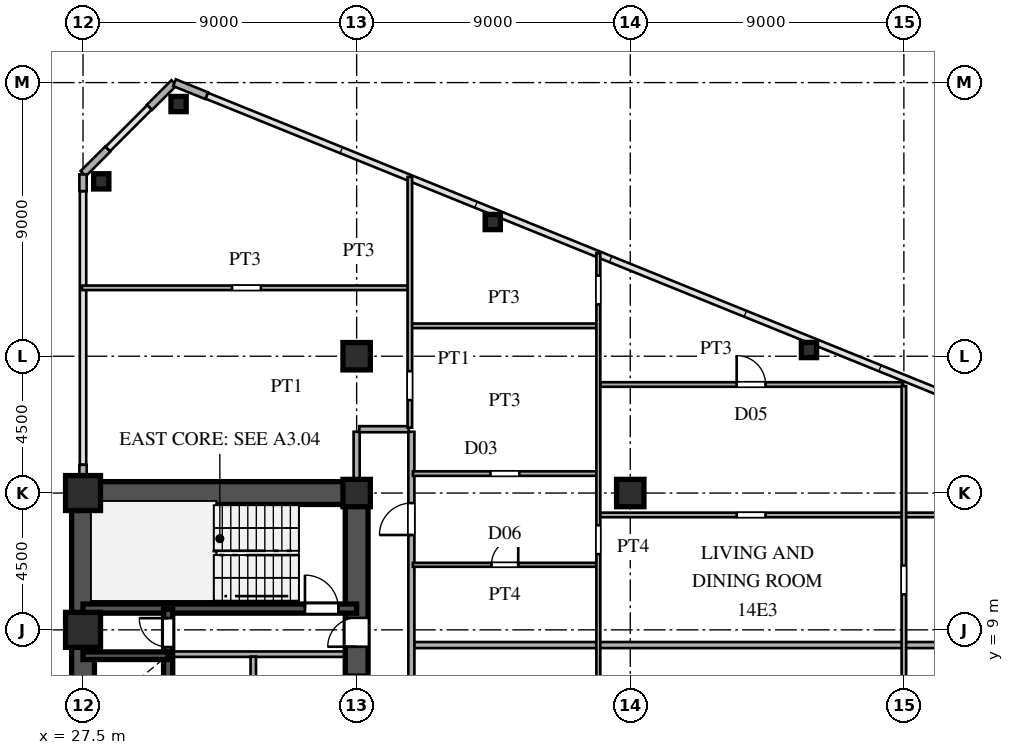
"""IFC4 building model, lengths in metres.
Left out: names, types, materials, properties, quantities, classifications, styles, units other than length and angle.
Written with IfcOpenShell. Run it as: python <this file> out.ifc"""

import sys

from ifc_helpers import new_model, si_unit, direction, frame, frame_2d, origin, origin_2d, place, context, subcontext, project, spatial, rectangle, hollow_rectangle, i_section, extrude, source, transform, mapped, element, fill, save


model = new_model("IFC4")
c1 = context("Model", 3, precision=1e-05, world=origin(), true_north=direction((0.0, 1.0)))
c2 = subcontext(c1, "Body", "Model", "MODEL_VIEW")
j1 = project(units=[si_unit("LENGTHUNIT", "METRE"), si_unit("PLANEANGLEUNIT", "RADIAN")], contexts=[c1])
p1 = place(None, origin())
s1 = spatial("IfcSite", under=j1, at=p1, CompositionType="ELEMENT")
p2 = place(p1, origin())
s2 = spatial("IfcBuilding", under=s1, at=p2, CompositionType="ELEMENT")
p3 = place(p2, frame((0.0, 0.0, 54.9)))
s3 = spatial("IfcBuildingStorey", under=s2, at=p3, CompositionType="ELEMENT", Elevation=54.9)
m1 = source(origin(), c2, "Body", "SweptSolid", [
    extrude(hollow_rectangle(XDim=1.15, YDim=1.15, WallThickness=0.048, at=origin_2d()), origin(), (0.0, 0.0, 1.0), 3.6),
])
for number, where, z_axis, x_axis in (
    (1, (27.5, 9.0, 0.0), (0.0, 0.0, 1.0), (1.0, 0.0, 0.0)),
    (2, (27.5, 13.5, 0.0), (0.0, 0.0, 1.0), (1.0, 0.0, 0.0)),
):
    element("IfcColumn", number, at=place(p3, frame(where, z_axis=z_axis, x_axis=x_axis)), inside=s3, PredefinedType="COLUMN", context=c2, shape_type="MappedRepresentation", body=[
        mapped(m1, transform((0.0, 0.0, 0.0), scale=1.0)),
    ])
m2 = source(origin(), c2, "Body", "SweptSolid", [
    extrude(i_section(OverallWidth=0.9, OverallDepth=0.9, WebThickness=0.036, FlangeThickness=0.055, at=origin_2d()), origin(), (0.0, 0.0, 1.0), 3.6),
])
for number, where, z_axis, x_axis in (
    (3, (36.5, 13.5, 0.0), (0.0, 0.0, 1.0), (1.0, 0.0, 0.0)),
    (4, (36.5, 18.0, 0.0), (0.0, 0.0, 1.0), (1.0, 0.0, 0.0)),
    (5, (45.5, 13.5, 0.0), (0.0, 0.0, 1.0), (1.0, 0.0, 0.0)),
):
    element("IfcColumn", number, at=place(p3, frame(where, z_axis=z_axis, x_axis=x_axis)), inside=s3, PredefinedType="COLUMN", context=c2, shape_type="MappedRepresentation", body=[
        mapped(m2, transform((0.0, 0.0, 0.0), scale=1.0)),
    ])
m3 = source(origin(), c2, "Body", "SweptSolid", [
    extrude(hollow_rectangle(XDim=0.5, YDim=0.5, WallThickness=0.02, at=origin_2d()), origin(), (0.0, 0.0, 1.0), 3.6),
])
for number, where, z_axis, x_axis in (
    (6, (30.643, 26.295, 0.0), (0.0, 0.0, 1.0), (1.0, 0.0, 0.0)),
    (7, (28.1, 23.751, 0.0), (0.0, 0.0, 1.0), (1.0, 0.0, 0.0)),
    (8, (40.977, 22.414, 0.0), (0.0, 0.0, 1.0), (1.0, 0.0, 0.0)),
    (9, (51.378, 18.204, 0.0), (0.0, 0.0, 1.0), (1.0, 0.0, 0.0)),
):
    element("IfcColumn", number, at=place(p3, frame(where, z_axis=z_axis, x_axis=x_axis)), inside=s3, PredefinedType="COLUMN", context=c2, shape_type="MappedRepresentation", body=[
        mapped(m3, transform((0.0, 0.0, 0.0), scale=1.0)),
    ])
p4 = place(p3, frame((31.566, 26.569, 0.0), z_axis=(0.0, 0.0, 1.0), x_axis=(-0.927007103665, 0.375043770452, 0.0)))
e10 = element("IfcWall", 10, at=p4, inside=s3, PredefinedType="SOLIDWALL", context=c2, shape_type="SweptSolid", body=[
    extrude(rectangle(XDim=1.14, YDim=0.24, at=frame_2d((0.57, 0.0))), origin(), (0.0, 0.0, 1.0), 3.38),
])
for number, where, z_axis, x_axis in (
    (11, (30.493, 26.993, 0.0), (0.0, 0.0, 1.0), (-0.707, -0.707, 0.0)),
    (12, (28.313, 24.813, 0.0), (0.0, 0.0, 1.0), (-0.707, -0.707, 0.0)),
):
    element("IfcWall", number, at=place(p3, frame(where, z_axis=z_axis, x_axis=x_axis)), inside=s3, PredefinedType="SOLIDWALL", context=c2, shape_type="SweptSolid", body=[
        extrude(rectangle(XDim=1.14, YDim=0.24, at=frame_2d((0.57, 0.0))), origin(), (0.0, 0.0, 1.0), 3.38),
    ])
p5 = place(p3, frame((27.5, 13.88, 0.0), z_axis=(0.0, 0.0, 1.0), x_axis=(0.0, 1.0, 0.0)))
e13 = element("IfcWall", 13, at=p5, inside=s3, PredefinedType="SOLIDWALL", context=c2, shape_type="SweptSolid", body=[
    extrude(rectangle(XDim=0.55, YDim=0.24, at=frame_2d((0.275, 0.0))), origin(), (0.0, 0.0, 1.0), 2.88),
])
p6 = place(p3, frame((27.5, 23.43, 0.0), z_axis=(0.0, 0.0, 1.0), x_axis=(0.0, 1.0, 0.0)))
e14 = element("IfcWall", 14, at=p6, inside=s3, PredefinedType="SOLIDWALL", context=c2, shape_type="SweptSolid", body=[
    extrude(rectangle(XDim=0.55, YDim=0.24, at=frame_2d((0.275, 0.0))), origin(), (0.0, 0.0, 1.0), 3.38),
])
p7 = place(p3, frame((27.5, 1.3, 0.0), z_axis=(0.0, 0.0, 1.0), x_axis=(0.0, 1.0, 0.0)))
e15 = element("IfcWall", 15, at=p7, inside=s3, PredefinedType="SHEAR", context=c2, shape_type="SweptSolid", body=[
    extrude(rectangle(XDim=12.2, YDim=0.75, at=frame_2d((6.1, 0.0))), origin(), (0.0, 0.0, 1.0), 3.38),
])
p8 = place(p3, frame((27.5, 13.5, 0.0), z_axis=(0.0, 0.0, 1.0), x_axis=(1.0, 0.0, 0.0)))
e16 = element("IfcWall", 16, at=p8, inside=s3, PredefinedType="SHEAR", context=c2, shape_type="SweptSolid", body=[
    extrude(rectangle(XDim=9.0, YDim=0.75, at=frame_2d((4.5, 0.0))), origin(), (0.0, 0.0, 1.0), 3.38),
])
p9 = place(p3, frame((36.5, 8.2, 0.0), z_axis=(0.0, 0.0, 1.0), x_axis=(0.0, 1.0, 0.0)))
e17 = element("IfcWall", 17, at=p9, inside=s3, PredefinedType="SHEAR", context=c2, shape_type="SweptSolid", body=[
    extrude(rectangle(XDim=5.45, YDim=0.75, at=frame_2d((2.725, 0.0))), origin(), (0.0, 0.0, 1.0), 3.38),
])
p10 = place(p9, frame((0.245, 0.0, 0.0)))
e18 = element("IfcOpeningElement", 18, at=p10, cuts=e17, PredefinedType="OPENING", context=c2, shape_type="SweptSolid", body=[
    extrude(rectangle(XDim=0.95, YDim=2.15, at=frame_2d((0.475, 1.075))), frame((0.0, 0.385, 0.0), z_axis=(0.0, -1.0, 0.0), x_axis=(1.0, 0.0, 0.0)), (0.0, 0.0, 1.0), 0.77),
])
p11 = place(p3, frame((36.5, 5.9, 0.0), z_axis=(0.0, 0.0, 1.0), x_axis=(0.0, 1.0, 0.0)))
e19 = element("IfcWall", 19, at=p11, inside=s3, PredefinedType="SHEAR", context=c2, shape_type="SweptSolid", body=[
    extrude(rectangle(XDim=2.3, YDim=0.75, at=frame_2d((1.15, 0.0))), origin(), (0.0, 0.0, 1.0), 3.38),
])
p12 = place(p11, frame((0.675, 0.0, 0.0)))
e20 = element("IfcOpeningElement", 20, at=p12, cuts=e19, PredefinedType="OPENING", context=c2, shape_type="SweptSolid", body=[
    extrude(rectangle(XDim=0.95, YDim=2.15, at=frame_2d((0.475, 1.075))), frame((0.0, 0.385, 0.0), z_axis=(0.0, -1.0, 0.0), x_axis=(1.0, 0.0, 0.0)), (0.0, 0.0, 1.0), 0.77),
])
p13 = place(p3, frame((27.5, 9.7, 0.0), z_axis=(0.0, 0.0, 1.0), x_axis=(1.0, 0.0, 0.0)))
e21 = element("IfcWall", 21, at=p13, inside=s3, PredefinedType="SHEAR", context=c2, shape_type="SweptSolid", body=[
    extrude(rectangle(XDim=9.0, YDim=0.3, at=frame_2d((4.5, 0.0))), origin(), (0.0, 0.0, 1.0), 3.38),
])
p14 = place(p13, frame((7.3, 0.0, 0.0)))
e22 = element("IfcOpeningElement", 22, at=p14, cuts=e21, PredefinedType="OPENING", context=c2, shape_type="SweptSolid", body=[
    extrude(rectangle(XDim=1.1, YDim=2.2, at=frame_2d((0.55, 1.1))), frame((0.0, 0.16, 0.0), z_axis=(0.0, -1.0, 0.0), x_axis=(1.0, 0.0, 0.0)), (0.0, 0.0, 1.0), 0.32),
])
p15 = place(p3, frame((27.5, 8.15, 0.0), z_axis=(0.0, 0.0, 1.0), x_axis=(1.0, 0.0, 0.0)))
e23 = element("IfcWall", 23, at=p15, inside=s3, PredefinedType="SHEAR", context=c2, shape_type="SweptSolid", body=[
    extrude(rectangle(XDim=2.8, YDim=0.25, at=frame_2d((1.4, 0.0))), origin(), (0.0, 0.0, 1.0), 3.38),
])
p16 = place(p3, frame((30.3, 5.9, 0.0), z_axis=(0.0, 0.0, 1.0), x_axis=(0.0, 1.0, 0.0)))
e24 = element("IfcWall", 24, at=p16, inside=s3, PredefinedType="SHEAR", context=c2, shape_type="SweptSolid", body=[
    extrude(rectangle(XDim=2.25, YDim=0.3, at=frame_2d((1.125, 0.0))), origin(), (0.0, 0.0, 1.0), 3.38),
])
p17 = place(p3, frame((30.3, 8.15, 0.0), z_axis=(0.0, 0.0, 1.0), x_axis=(0.0, 1.0, 0.0)))
e25 = element("IfcWall", 25, at=p17, inside=s3, PredefinedType="SHEAR", context=c2, shape_type="SweptSolid", body=[
    extrude(rectangle(XDim=1.53, YDim=0.3, at=frame_2d((0.765, 0.0))), origin(), (0.0, 0.0, 1.0), 3.38),
])
p18 = place(p17, frame((0.285, 0.0, 0.0)))
e26 = element("IfcOpeningElement", 26, at=p18, cuts=e25, PredefinedType="OPENING", context=c2, shape_type="SweptSolid", body=[
    extrude(rectangle(XDim=0.95, YDim=2.15, at=frame_2d((0.475, 1.075))), frame((0.0, 0.16, 0.0), z_axis=(0.0, -1.0, 0.0), x_axis=(1.0, 0.0, 0.0)), (0.0, 0.0, 1.0), 0.32),
])
p19 = place(p3, frame((30.45, 8.2, 0.0), z_axis=(0.0, 0.0, 1.0), x_axis=(1.0, 0.0, 0.0)))
e27 = element("IfcWall", 27, at=p19, inside=s3, PredefinedType="PARTITIONING", context=c2, shape_type="SweptSolid", body=[
    extrude(rectangle(XDim=5.7, YDim=0.18, at=frame_2d((2.85, 0.0))), origin(), (0.0, 0.0, 1.0), 3.38),
])
p20 = place(p3, frame((33.1, 1.38, 0.0), z_axis=(0.0, 0.0, 1.0), x_axis=(0.0, 1.0, 0.0)))
e28 = element("IfcWall", 28, at=p20, inside=s3, PredefinedType="PARTITIONING", context=c2, shape_type="SweptSolid", body=[
    extrude(rectangle(XDim=6.74, YDim=0.18, at=frame_2d((3.37, 0.0))), origin(), (0.0, 0.0, 1.0), 3.38),
])
p21 = place(p3, frame((38.38, 8.5, 0.0), z_axis=(0.0, 0.0, 1.0), x_axis=(1.0, 0.0, 0.0)))
e29 = element("IfcWall", 29, at=p21, inside=s3, PredefinedType="PARTITIONING", context=c2, shape_type="SweptSolid", body=[
    extrude(rectangle(XDim=34.125, YDim=0.2, at=frame_2d((17.062, 0.0))), origin(), (0.0, 0.0, 1.0), 3.38),
])
p22 = place(p3, frame((38.35, 11.14, 0.0), z_axis=(0.0, 0.0, 1.0), x_axis=(1.0, 0.0, 0.0)))
e30 = element("IfcWall", 30, at=p22, inside=s3, PredefinedType="PARTITIONING", context=c2, shape_type="SweptSolid", body=[
    extrude(rectangle(XDim=6.05, YDim=0.13, at=frame_2d((3.025, 0.0))), origin(), (0.0, 0.0, 1.0), 3.38),
])
p23 = place(p22, frame((2.585, 0.0, 0.0)))
e31 = element("IfcOpeningElement", 31, at=p23, cuts=e30, PredefinedType="OPENING", context=c2, shape_type="SweptSolid", body=[
    extrude(rectangle(XDim=0.88, YDim=2.1, at=frame_2d((0.44, 1.05))), frame((0.0, 0.075, 0.0), z_axis=(0.0, -1.0, 0.0), x_axis=(1.0, 0.0, 0.0)), (0.0, 0.0, 1.0), 0.15),
])
p24 = place(p3, frame((44.5, 12.78, 0.0), z_axis=(0.0, 0.0, 1.0), x_axis=(1.0, 0.0, 0.0)))
e32 = element("IfcWall", 32, at=p24, inside=s3, PredefinedType="PARTITIONING", context=c2, shape_type="SweptSolid", body=[
    extrude(rectangle(XDim=21.156, YDim=0.15, at=frame_2d((10.578, 0.0))), origin(), (0.0, 0.0, 1.0), 3.38),
])
p25 = place(p24, frame((4.5, 0.0, 0.0)))
e33 = element("IfcOpeningElement", 33, at=p25, cuts=e32, PredefinedType="OPENING", context=c2, shape_type="SweptSolid", body=[
    extrude(rectangle(XDim=0.95, YDim=2.15, at=frame_2d((0.475, 1.075))), frame((0.0, 0.085, 0.0), z_axis=(0.0, -1.0, 0.0), x_axis=(1.0, 0.0, 0.0)), (0.0, 0.0, 1.0), 0.17),
])
p26 = place(p24, frame((12.375, 0.0, 0.0)))
e34 = element("IfcOpeningElement", 34, at=p26, cuts=e32, PredefinedType="OPENING", context=c2, shape_type="SweptSolid", body=[
    extrude(rectangle(XDim=0.95, YDim=2.15, at=frame_2d((0.475, 1.075))), frame((0.0, 0.085, 0.0), z_axis=(0.0, -1.0, 0.0), x_axis=(1.0, 0.0, 0.0)), (0.0, 0.0, 1.0), 0.17),
])
p27 = place(p3, frame((38.35, 14.14, 0.0), z_axis=(0.0, 0.0, 1.0), x_axis=(1.0, 0.0, 0.0)))
e35 = element("IfcWall", 35, at=p27, inside=s3, PredefinedType="PARTITIONING", context=c2, shape_type="SweptSolid", body=[
    extrude(rectangle(XDim=6.05, YDim=0.15, at=frame_2d((3.025, 0.0))), origin(), (0.0, 0.0, 1.0), 3.38),
])
p28 = place(p27, frame((2.55, 0.0, 0.0)))
e36 = element("IfcOpeningElement", 36, at=p28, cuts=e35, PredefinedType="OPENING", context=c2, shape_type="SweptSolid", body=[
    extrude(rectangle(XDim=0.95, YDim=2.15, at=frame_2d((0.475, 1.075))), frame((0.0, 0.085, 0.0), z_axis=(0.0, -1.0, 0.0), x_axis=(1.0, 0.0, 0.0)), (0.0, 0.0, 1.0), 0.17),
])
p29 = place(p3, frame((36.585, 15.6, 0.0), z_axis=(0.0, 0.0, 1.0), x_axis=(1.0, 0.0, 0.0)))
e37 = element("IfcWall", 37, at=p29, inside=s3, PredefinedType="PARTITIONING", context=c2, shape_type="SweptSolid", body=[
    extrude(rectangle(XDim=1.63, YDim=0.2, at=frame_2d((0.815, 0.0))), origin(), (0.0, 0.0, 1.0), 3.38),
])
p30 = place(p3, frame((44.5, 17.07, 0.0), z_axis=(0.0, 0.0, 1.0), x_axis=(1.0, 0.0, 0.0)))
e38 = element("IfcWall", 38, at=p30, inside=s3, PredefinedType="PARTITIONING", context=c2, shape_type="SweptSolid", body=[
    extrude(rectangle(XDim=9.95, YDim=0.15, at=frame_2d((4.975, 0.0))), origin(), (0.0, 0.0, 1.0), 3.38),
])
p31 = place(p30, frame((4.5, 0.0, 0.0)))
e39 = element("IfcOpeningElement", 39, at=p31, cuts=e38, PredefinedType="OPENING", context=c2, shape_type="SweptSolid", body=[
    extrude(rectangle(XDim=0.95, YDim=2.15, at=frame_2d((0.475, 1.075))), frame((0.0, 0.085, 0.0), z_axis=(0.0, -1.0, 0.0), x_axis=(1.0, 0.0, 0.0)), (0.0, 0.0, 1.0), 0.17),
])
p32 = place(p3, frame((38.3, 19.0, 0.0), z_axis=(0.0, 0.0, 1.0), x_axis=(1.0, 0.0, 0.0)))
e40 = element("IfcWall", 40, at=p32, inside=s3, PredefinedType="PARTITIONING", context=c2, shape_type="SweptSolid", body=[
    extrude(rectangle(XDim=6.1, YDim=0.15, at=frame_2d((3.05, 0.0))), origin(), (0.0, 0.0, 1.0), 3.38),
])
p33 = place(p3, frame((27.465, 20.25, 0.0), z_axis=(0.0, 0.0, 1.0), x_axis=(1.0, 0.0, 0.0)))
e41 = element("IfcWall", 41, at=p33, inside=s3, PredefinedType="PARTITIONING", context=c2, shape_type="SweptSolid", body=[
    extrude(rectangle(XDim=10.735, YDim=0.15, at=frame_2d((5.367, 0.0))), origin(), (0.0, 0.0, 1.0), 3.38),
])
p34 = place(p33, frame((4.935, 0.0, 0.0)))
e42 = element("IfcOpeningElement", 42, at=p34, cuts=e41, PredefinedType="OPENING", context=c2, shape_type="SweptSolid", body=[
    extrude(rectangle(XDim=0.95, YDim=2.15, at=frame_2d((0.475, 1.075))), frame((0.0, 0.085, 0.0), z_axis=(0.0, -1.0, 0.0), x_axis=(1.0, 0.0, 0.0)), (0.0, 0.0, 1.0), 0.17),
])
p35 = place(p3, frame((36.5, 13.88, 0.0), z_axis=(0.0, 0.0, 1.0), x_axis=(0.0, 1.0, 0.0)))
e43 = element("IfcWall", 43, at=p35, inside=s3, PredefinedType="PARTITIONING", context=c2, shape_type="SweptSolid", body=[
    extrude(rectangle(XDim=1.635, YDim=0.2, at=frame_2d((0.817, 0.0))), origin(), (0.0, 0.0, 1.0), 2.68),
])
p36 = place(p3, frame((38.25, 15.65, 0.0), z_axis=(0.0, 0.0, 1.0), x_axis=(0.0, 1.0, 0.0)))
e44 = element("IfcWall", 44, at=p36, inside=s3, PredefinedType="PARTITIONING", context=c2, shape_type="SweptSolid", body=[
    extrude(rectangle(XDim=8.248, YDim=0.15, at=frame_2d((4.124, 0.0))), origin(), (0.0, 0.0, 1.0), 3.38),
])
p37 = place(p36, frame((0.907, 0.0, 0.0)))
e45 = element("IfcOpeningElement", 45, at=p37, cuts=e44, PredefinedType="OPENING", context=c2, shape_type="SweptSolid", body=[
    extrude(rectangle(XDim=0.95, YDim=2.15, at=frame_2d((0.475, 1.075))), frame((0.0, 0.085, 0.0), z_axis=(0.0, -1.0, 0.0), x_axis=(1.0, 0.0, 0.0)), (0.0, 0.0, 1.0), 0.17),
])
p38 = place(p3, frame((38.3, -15.515, 0.0), z_axis=(0.0, 0.0, 1.0), x_axis=(0.0, 1.0, 0.0)))
e46 = element("IfcWall", 46, at=p38, inside=s3, PredefinedType="PARTITIONING", context=c2, shape_type="SweptSolid", body=[
    extrude(rectangle(XDim=31.03, YDim=0.2, at=frame_2d((15.515, 0.0))), origin(), (0.0, 0.0, 1.0), 3.38),
])
p39 = place(p38, frame((4.413, 0.0, 0.0)))
e47 = element("IfcOpeningElement", 47, at=p39, cuts=e46, PredefinedType="OPENING", context=c2, shape_type="SweptSolid", body=[
    extrude(rectangle(XDim=1.05, YDim=2.25, at=frame_2d((0.525, 1.125))), frame((0.0, 0.11, 0.0), z_axis=(0.0, -1.0, 0.0), x_axis=(1.0, 0.0, 0.0)), (0.0, 0.0, 1.0), 0.22),
])
p40 = place(p38, frame((16.28, 0.0, 0.0)))
e48 = element("IfcOpeningElement", 48, at=p40, cuts=e46, PredefinedType="OPENING", context=c2, shape_type="SweptSolid", body=[
    extrude(rectangle(XDim=1.05, YDim=2.25, at=frame_2d((0.525, 1.125))), frame((0.0, 0.11, 0.0), z_axis=(0.0, -1.0, 0.0), x_axis=(1.0, 0.0, 0.0)), (0.0, 0.0, 1.0), 0.22),
])
p41 = place(p38, frame((27.635, 0.0, 0.0)))
e49 = element("IfcOpeningElement", 49, at=p41, cuts=e46, PredefinedType="OPENING", context=c2, shape_type="SweptSolid", body=[
    extrude(rectangle(XDim=1.05, YDim=2.25, at=frame_2d((0.525, 1.125))), frame((0.0, 0.11, 0.0), z_axis=(0.0, -1.0, 0.0), x_axis=(1.0, 0.0, 0.0)), (0.0, 0.0, 1.0), 0.22),
])
p42 = place(p3, frame((44.45, 4.352, 0.0), z_axis=(0.0, 0.0, 1.0), x_axis=(0.0, 1.0, 0.0)))
e50 = element("IfcWall", 50, at=p42, inside=s3, PredefinedType="PARTITIONING", context=c2, shape_type="SweptSolid", body=[
    extrude(rectangle(XDim=17.037, YDim=0.13, at=frame_2d((8.519, 0.0))), origin(), (0.0, 0.0, 1.0), 3.38),
])
p43 = place(p42, frame((7.138, 0.0, 0.0)))
e51 = element("IfcOpeningElement", 51, at=p43, cuts=e50, PredefinedType="OPENING", context=c2, shape_type="SweptSolid", body=[
    extrude(rectangle(XDim=0.95, YDim=2.15, at=frame_2d((0.475, 1.075))), frame((0.0, 0.075, 0.0), z_axis=(0.0, -1.0, 0.0), x_axis=(1.0, 0.0, 0.0)), (0.0, 0.0, 1.0), 0.15),
])
p44 = place(p42, frame((15.352, 0.0, 0.0)))
e52 = element("IfcOpeningElement", 52, at=p44, cuts=e50, PredefinedType="OPENING", context=c2, shape_type="SweptSolid", body=[
    extrude(rectangle(XDim=0.95, YDim=2.15, at=frame_2d((0.475, 1.075))), frame((0.0, 0.075, 0.0), z_axis=(0.0, -1.0, 0.0), x_axis=(1.0, 0.0, 0.0)), (0.0, 0.0, 1.0), 0.15),
])
p45 = place(p3, frame((54.5, -16.019, 0.0), z_axis=(0.0, 0.0, 1.0), x_axis=(0.0, 1.0, 0.0)))
e53 = element("IfcWall", 53, at=p45, inside=s3, PredefinedType="PARTITIONING", context=c2, shape_type="SweptSolid", body=[
    extrude(rectangle(XDim=33.038, YDim=0.15, at=frame_2d((16.519, 0.0))), origin(), (0.0, 0.0, 1.0), 2.68),
])
p46 = place(p45, frame((7.402, 0.0, 0.0)))
e54 = element("IfcOpeningElement", 54, at=p46, cuts=e53, PredefinedType="OPENING", context=c2, shape_type="SweptSolid", body=[
    extrude(rectangle(XDim=0.95, YDim=2.15, at=frame_2d((0.475, 1.075))), frame((0.0, 0.085, 0.0), z_axis=(0.0, -1.0, 0.0), x_axis=(1.0, 0.0, 0.0)), (0.0, 0.0, 1.0), 0.17),
])
p47 = place(p45, frame((17.044, 0.0, 0.0)))
e55 = element("IfcOpeningElement", 55, at=p47, cuts=e53, PredefinedType="OPENING", context=c2, shape_type="SweptSolid", body=[
    extrude(rectangle(XDim=0.95, YDim=2.15, at=frame_2d((0.475, 1.075))), frame((0.0, 0.085, 0.0), z_axis=(0.0, -1.0, 0.0), x_axis=(1.0, 0.0, 0.0)), (0.0, 0.0, 1.0), 0.17),
])
p48 = place(p45, frame((26.186, 0.0, 0.0)))
e56 = element("IfcOpeningElement", 56, at=p48, cuts=e53, PredefinedType="OPENING", context=c2, shape_type="SweptSolid", body=[
    extrude(rectangle(XDim=0.95, YDim=2.15, at=frame_2d((0.475, 1.075))), frame((0.0, 0.085, 0.0), z_axis=(0.0, -1.0, 0.0), x_axis=(1.0, 0.0, 0.0)), (0.0, 0.0, 1.0), 0.17),
])
m4 = source(origin(), c2, "Body", "SweptSolid", [
    extrude(rectangle(XDim=0.95, YDim=2.15, at=frame_2d((0.475, 1.075))), frame((0.0, 0.025, 0.0), z_axis=(0.0, -1.0, 0.0), x_axis=(1.0, 0.0, 0.0)), (0.0, 0.0, 1.0), 0.05),
])
p49 = place(p10, origin())
e57 = element("IfcDoor", 57, at=p49, inside=s3, OperationType="SINGLE_SWING_LEFT", PredefinedType="DOOR", context=c2, shape_type="MappedRepresentation", body=[
    mapped(m4, transform((0.0, 0.0, 0.0), scale=1.0)),
])
fill(e18, e57)
p50 = place(p12, origin())
e58 = element("IfcDoor", 58, at=p50, inside=s3, OperationType="SINGLE_SWING_LEFT", PredefinedType="DOOR", context=c2, shape_type="MappedRepresentation", body=[
    mapped(m4, transform((0.0, 0.0, 0.0), scale=1.0)),
])
fill(e20, e58)
m5 = source(origin(), c2, "Body", "SweptSolid", [
    extrude(rectangle(XDim=1.1, YDim=2.2, at=frame_2d((0.55, 1.1))), frame((0.0, 0.025, 0.0), z_axis=(0.0, -1.0, 0.0), x_axis=(1.0, 0.0, 0.0)), (0.0, 0.0, 1.0), 0.05),
])
p51 = place(p14, origin())
e59 = element("IfcDoor", 59, at=p51, inside=s3, OperationType="SINGLE_SWING_LEFT", PredefinedType="DOOR", context=c2, shape_type="MappedRepresentation", body=[
    mapped(m5, transform((0.0, 0.0, 0.0), scale=1.0)),
])
fill(e22, e59)
p52 = place(p18, origin())
e60 = element("IfcDoor", 60, at=p52, inside=s3, OperationType="SINGLE_SWING_RIGHT", PredefinedType="DOOR", context=c2, shape_type="MappedRepresentation", body=[
    mapped(m4, transform((0.0, 0.0, 0.0), scale=1.0)),
])
fill(e26, e60)
m6 = source(origin(), c2, "Body", "SweptSolid", [
    extrude(rectangle(XDim=0.88, YDim=2.1, at=frame_2d((0.44, 1.05))), frame((0.0, 0.025, 0.0), z_axis=(0.0, -1.0, 0.0), x_axis=(1.0, 0.0, 0.0)), (0.0, 0.0, 1.0), 0.05),
])
p53 = place(p23, origin())
e61 = element("IfcDoor", 61, at=p53, inside=s3, OperationType="SINGLE_SWING_RIGHT", PredefinedType="DOOR", context=c2, shape_type="MappedRepresentation", body=[
    mapped(m6, transform((0.0, 0.0, 0.0), scale=1.0)),
])
fill(e31, e61)
m7 = source(origin(), c2, "Body", "SweptSolid", [
    extrude(rectangle(XDim=0.95, YDim=2.15, at=frame_2d((0.475, 1.075))), frame((0.0, 0.025, 0.0), z_axis=(0.0, -1.0, 0.0), x_axis=(1.0, 0.0, 0.0)), (0.0, 0.0, 1.0), 0.05),
])
p54 = place(p31, origin())
e62 = element("IfcDoor", 62, at=p54, inside=s3, OperationType="SINGLE_SWING_LEFT", PredefinedType="DOOR", context=c2, shape_type="MappedRepresentation", body=[
    mapped(m7, transform((0.0, 0.0, 0.0), scale=1.0)),
])
fill(e39, e62)
m8 = source(origin(), c2, "Body", "SweptSolid", [
    extrude(rectangle(XDim=1.05, YDim=2.25, at=frame_2d((0.525, 1.125))), frame((0.0, 0.025, 0.0), z_axis=(0.0, -1.0, 0.0), x_axis=(1.0, 0.0, 0.0)), (0.0, 0.0, 1.0), 0.05),
])
p55 = place(p41, origin())
e63 = element("IfcDoor", 63, at=p55, inside=s3, OperationType="SINGLE_SWING_LEFT", PredefinedType="DOOR", context=c2, shape_type="MappedRepresentation", body=[
    mapped(m8, transform((0.0, 0.0, 0.0), scale=1.0)),
])
fill(e49, e63)
save(model, sys.argv[1])
